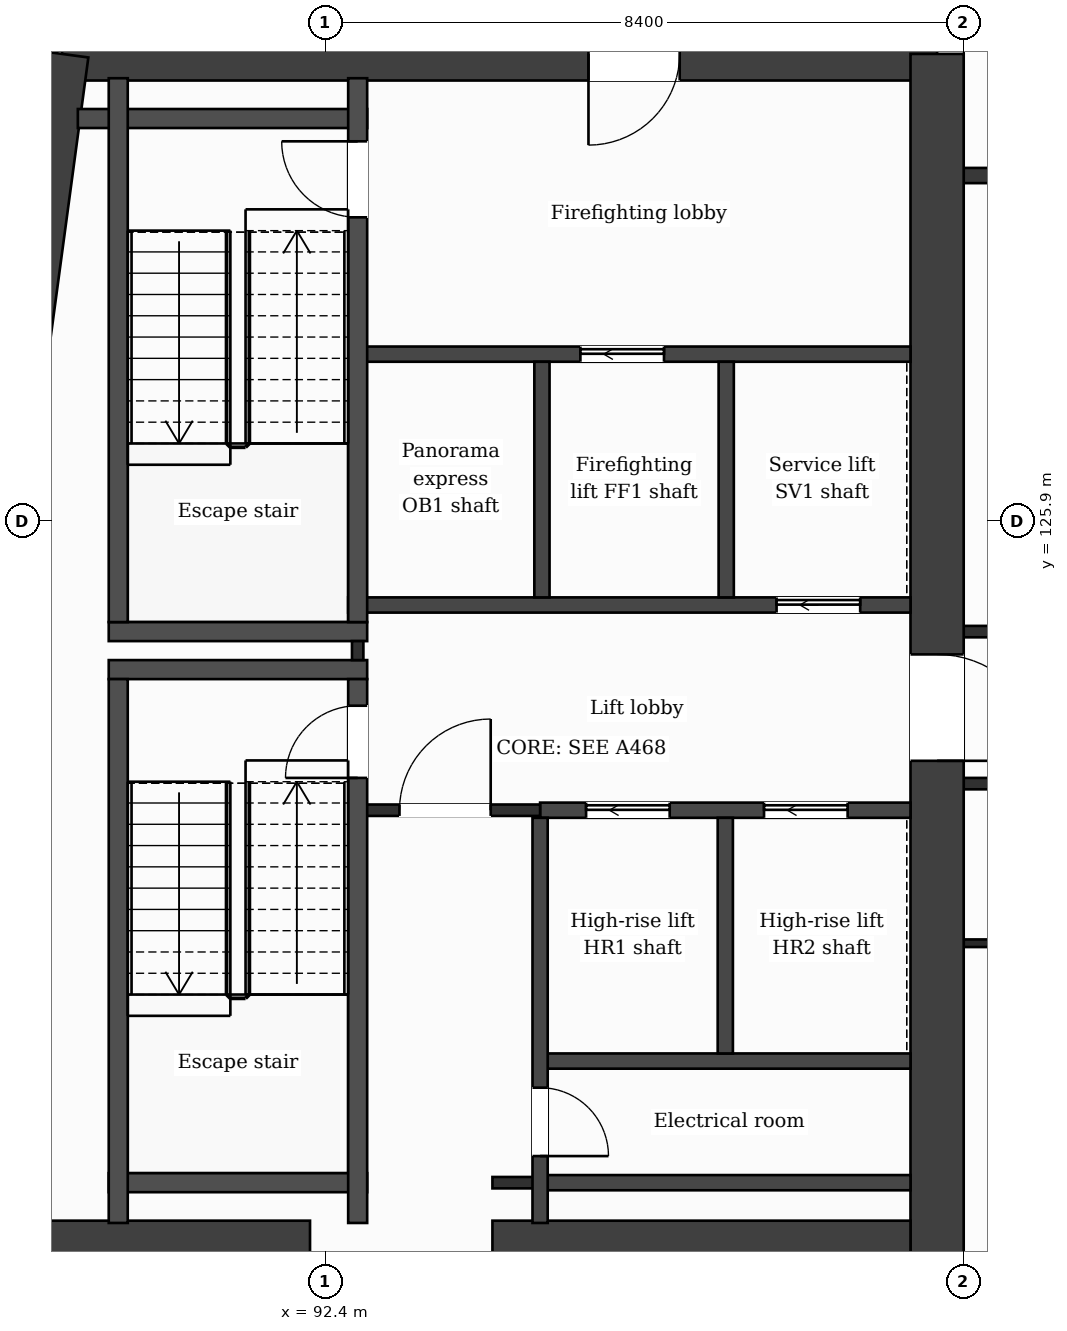
"""IFC4 building model, lengths in metres.
Left out: names, types, materials, properties, quantities, classifications, styles, units other than length and angle.
Written with IfcOpenShell. Run it as: python <this file> out.ifc"""

import sys

from ifc_helpers import new_model, si_unit, direction, frame, frame_2d, origin, place, context, subcontext, project, spatial, rectangle, extrude, element, fill, save


model = new_model("IFC4")
c1 = context("Model", 3, precision=1e-05, world=origin(), true_north=direction((0.0, 1.0)))
c2 = subcontext(c1, "Body", "Model", "MODEL_VIEW")
j1 = project(units=[si_unit("LENGTHUNIT", "METRE"), si_unit("PLANEANGLEUNIT", "RADIAN")], contexts=[c1])
p1 = place(None, origin())
s1 = spatial("IfcSite", under=j1, at=p1, CompositionType="ELEMENT")
p2 = place(p1, origin())
s2 = spatial("IfcBuilding", under=s1, at=p2, CompositionType="ELEMENT")
p3 = place(p2, frame((0.0, 0.0, 277.5)))
s3 = spatial("IfcBuildingStorey", under=s2, at=p3, CompositionType="ELEMENT", Elevation=277.5)
p4 = place(p3, frame((88.937, 132.05, 0.0), z_axis=(0.0, 0.0, 1.0), x_axis=(1.0, 0.0, 0.0)))
e1 = element("IfcWall", 1, at=p4, inside=s3, PredefinedType="SHEAR", context=c2, shape_type="SweptSolid", body=[
    extrude(rectangle(XDim=11.513, YDim=0.7, at=frame_2d((5.757, 0.0))), origin(), (0.0, 0.0, 1.0), 3.7),
])
p5 = place(p4, frame((6.927, 0.0, 0.0)))
e2 = element("IfcOpeningElement", 2, at=p5, cuts=e1, PredefinedType="OPENING", context=c2, shape_type="SweptSolid", body=[
    extrude(rectangle(XDim=1.2, YDim=2.1, at=frame_2d((0.6, 1.05))), frame((0.0, 0.36, 0.0), z_axis=(0.0, -1.0, 0.0), x_axis=(1.0, 0.0, 0.0)), (0.0, 0.0, 1.0), 0.72),
])
p6 = place(p3, frame((100.45, 132.05, 0.0), z_axis=(0.0, 0.0, 1.0), x_axis=(0.0, -1.0, 0.0)))
e3 = element("IfcWall", 3, at=p6, inside=s3, PredefinedType="SHEAR", context=c2, shape_type="SweptSolid", body=[
    extrude(rectangle(XDim=21.3, YDim=0.7, at=frame_2d((10.65, 0.0))), origin(), (0.0, 0.0, 1.0), 3.7),
])
p7 = place(p6, frame((7.9, 0.0, 0.0)))
e4 = element("IfcOpeningElement", 4, at=p7, cuts=e3, PredefinedType="OPENING", context=c2, shape_type="SweptSolid", body=[
    extrude(rectangle(XDim=1.4, YDim=2.1, at=frame_2d((0.7, 1.05))), frame((0.0, 0.36, 0.0), z_axis=(0.0, -1.0, 0.0), x_axis=(1.0, 0.0, 0.0)), (0.0, 0.0, 1.0), 0.72),
])
p8 = place(p3, frame((86.07, 110.75, 0.0), z_axis=(0.0, 0.0, 1.0), x_axis=(0.133406218907, 0.991061441464, 0.0)))
e5 = element("IfcWall", 5, at=p8, inside=s3, PredefinedType="SHEAR", context=c2, shape_type="SweptSolid", body=[
    extrude(rectangle(XDim=21.492, YDim=0.7, at=frame_2d((10.746, 0.0))), origin(), (0.0, 0.0, 1.0), 3.7),
])
p9 = place(p3, frame((87.123, 116.35, 0.0), z_axis=(0.0, 0.0, 1.0), x_axis=(1.0, 0.0, 0.0)))
e6 = element("IfcWall", 6, at=p9, inside=s3, PredefinedType="SHEAR", context=c2, shape_type="SweptSolid", body=[
    extrude(rectangle(XDim=5.077, YDim=0.7, at=frame_2d((2.539, 0.0))), origin(), (0.0, 0.0, 1.0), 3.7),
])
p10 = place(p3, frame((94.6, 116.35, 0.0), z_axis=(0.0, 0.0, 1.0), x_axis=(1.0, 0.0, 0.0)))
e7 = element("IfcWall", 7, at=p10, inside=s3, PredefinedType="SHEAR", context=c2, shape_type="SweptSolid", body=[
    extrude(rectangle(XDim=5.5, YDim=0.7, at=frame_2d((2.75, 0.0))), origin(), (0.0, 0.0, 1.0), 3.7),
])
p11 = place(p3, frame((95.227, 117.2, 0.0), z_axis=(0.0, 0.0, 1.0), x_axis=(1.0, 0.0, 0.0)))
e8 = element("IfcWall", 8, at=p11, inside=s3, PredefinedType="PARTITIONING", context=c2, shape_type="SweptSolid", body=[
    extrude(rectangle(XDim=4.873, YDim=0.2, at=frame_2d((2.437, 0.0))), origin(), (0.0, 0.0, 1.0), 3.38),
])
p12 = place(p3, frame((94.6, 117.2, 0.0), z_axis=(0.0, 0.0, 1.0), x_axis=(1.0, 0.0, 0.0)))
e9 = element("IfcWall", 9, at=p12, inside=s3, PredefinedType="PARTITIONING", context=c2, shape_type="SweptSolid", body=[
    extrude(rectangle(XDim=0.627, YDim=0.15, at=frame_2d((0.313, 0.0))), origin(), (0.0, 0.0, 1.0), 3.38),
])
p13 = place(p3, frame((89.552, 117.2, 0.0), z_axis=(0.0, 0.0, 1.0), x_axis=(1.0, 0.0, 0.0)))
e10 = element("IfcWall", 10, at=p13, inside=s3, PredefinedType="PARTITIONING", context=c2, shape_type="SweptSolid", body=[
    extrude(rectangle(XDim=3.4, YDim=0.25, at=frame_2d((1.7, 0.0))), origin(), (0.0, 0.0, 1.0), 3.38),
])
p14 = place(p3, frame((95.227, 118.8, 0.0), z_axis=(0.0, 0.0, 1.0), x_axis=(1.0, 0.0, 0.0)))
e11 = element("IfcWall", 11, at=p14, inside=s3, PredefinedType="PARTITIONING", context=c2, shape_type="SweptSolid", body=[
    extrude(rectangle(XDim=4.873, YDim=0.2, at=frame_2d((2.437, 0.0))), origin(), (0.0, 0.0, 1.0), 3.38),
])
p15 = place(p3, frame((100.8, 120.35, 0.0), z_axis=(0.0, 0.0, 1.0), x_axis=(1.0, 0.0, 0.0)))
e12 = element("IfcWall", 12, at=p15, inside=s3, PredefinedType="PARTITIONING", context=c2, shape_type="SweptSolid", body=[
    extrude(rectangle(XDim=2.75, YDim=0.1, at=frame_2d((1.375, 0.0))), origin(), (0.0, 0.0, 1.0), 3.38),
])
p16 = place(p15, frame((1.07, 0.0, 0.0)))
e13 = element("IfcOpeningElement", 13, at=p16, cuts=e12, PredefinedType="OPENING", context=c2, shape_type="SweptSolid", body=[
    extrude(rectangle(XDim=0.8, YDim=2.1, at=frame_2d((0.4, 1.05))), frame((0.0, 0.06, 0.0), z_axis=(0.0, -1.0, 0.0), x_axis=(1.0, 0.0, 0.0)), (0.0, 0.0, 1.0), 0.12),
])
p17 = place(p3, frame((95.227, 122.1, 0.0), z_axis=(0.0, 0.0, 1.0), x_axis=(1.0, 0.0, 0.0)))
e14 = element("IfcWall", 14, at=p17, inside=s3, PredefinedType="PARTITIONING", context=c2, shape_type="SweptSolid", body=[
    extrude(rectangle(XDim=4.873, YDim=0.2, at=frame_2d((2.437, 0.0))), origin(), (0.0, 0.0, 1.0), 3.38),
])
p18 = place(p17, frame((0.605, 0.0, 0.0)))
e15 = element("IfcOpeningElement", 15, at=p18, cuts=e14, PredefinedType="OPENING", context=c2, shape_type="SweptSolid", body=[
    extrude(rectangle(XDim=1.1, YDim=2.1, at=frame_2d((0.55, 1.05))), frame((0.0, 0.11, 0.0), z_axis=(0.0, -1.0, 0.0), x_axis=(1.0, 0.0, 0.0)), (0.0, 0.0, 1.0), 0.22),
])
p19 = place(p17, frame((2.946, 0.0, 0.0)))
e16 = element("IfcOpeningElement", 16, at=p19, cuts=e14, PredefinedType="OPENING", context=c2, shape_type="SweptSolid", body=[
    extrude(rectangle(XDim=1.1, YDim=2.1, at=frame_2d((0.55, 1.05))), frame((0.0, 0.11, 0.0), z_axis=(0.0, -1.0, 0.0), x_axis=(1.0, 0.0, 0.0)), (0.0, 0.0, 1.0), 0.22),
])
p20 = place(p3, frame((92.827, 122.1, 0.0), z_axis=(0.0, 0.0, 1.0), x_axis=(1.0, 0.0, 0.0)))
e17 = element("IfcWall", 17, at=p20, inside=s3, PredefinedType="PARTITIONING", context=c2, shape_type="SweptSolid", body=[
    extrude(rectangle(XDim=2.4, YDim=0.15, at=frame_2d((1.2, 0.0))), origin(), (0.0, 0.0, 1.0), 3.38),
])
p21 = place(p20, frame((0.55, 0.0, 0.0)))
e18 = element("IfcOpeningElement", 18, at=p21, cuts=e17, PredefinedType="OPENING", context=c2, shape_type="SweptSolid", body=[
    extrude(rectangle(XDim=1.2, YDim=2.1, at=frame_2d((0.6, 1.05))), frame((0.0, 0.085, 0.0), z_axis=(0.0, -1.0, 0.0), x_axis=(1.0, 0.0, 0.0)), (0.0, 0.0, 1.0), 0.17),
])
p22 = place(p3, frame((100.8, 122.45, 0.0), z_axis=(0.0, 0.0, 1.0), x_axis=(1.0, 0.0, 0.0)))
e19 = element("IfcWall", 19, at=p22, inside=s3, PredefinedType="PARTITIONING", context=c2, shape_type="SweptSolid", body=[
    extrude(rectangle(XDim=25.2, YDim=0.15, at=frame_2d((12.6, 0.0))), origin(), (0.0, 0.0, 1.0), 3.38),
])
p23 = place(p22, frame((5.55, 0.0, 0.0)))
e20 = element("IfcOpeningElement", 20, at=p23, cuts=e19, PredefinedType="OPENING", context=c2, shape_type="SweptSolid", body=[
    extrude(rectangle(XDim=1.0, YDim=2.1, at=frame_2d((0.5, 1.05))), frame((0.0, 0.085, 0.0), z_axis=(0.0, -1.0, 0.0), x_axis=(1.0, 0.0, 0.0)), (0.0, 0.0, 1.0), 0.17),
])
p24 = place(p22, frame((8.862, 0.0, 0.0)))
e21 = element("IfcOpeningElement", 21, at=p24, cuts=e19, PredefinedType="OPENING", context=c2, shape_type="SweptSolid", body=[
    extrude(rectangle(XDim=0.95, YDim=2.1, at=frame_2d((0.475, 1.05))), frame((0.0, 0.085, 0.0), z_axis=(0.0, -1.0, 0.0), x_axis=(1.0, 0.0, 0.0)), (0.0, 0.0, 1.0), 0.17),
])
p25 = place(p22, frame((15.2, 0.0, 0.0)))
e22 = element("IfcOpeningElement", 22, at=p25, cuts=e19, PredefinedType="OPENING", context=c2, shape_type="SweptSolid", body=[
    extrude(rectangle(XDim=0.95, YDim=2.1, at=frame_2d((0.475, 1.05))), frame((0.0, 0.085, 0.0), z_axis=(0.0, -1.0, 0.0), x_axis=(1.0, 0.0, 0.0)), (0.0, 0.0, 1.0), 0.17),
])
p26 = place(p22, frame((17.325, 0.0, 0.0)))
e23 = element("IfcOpeningElement", 23, at=p26, cuts=e19, PredefinedType="OPENING", context=c2, shape_type="SweptSolid", body=[
    extrude(rectangle(XDim=1.0, YDim=2.1, at=frame_2d((0.5, 1.05))), frame((0.0, 0.085, 0.0), z_axis=(0.0, -1.0, 0.0), x_axis=(1.0, 0.0, 0.0)), (0.0, 0.0, 1.0), 0.17),
])
p27 = place(p22, frame((23.862, 0.0, 0.0)))
e24 = element("IfcOpeningElement", 24, at=p27, cuts=e19, PredefinedType="OPENING", context=c2, shape_type="SweptSolid", body=[
    extrude(rectangle(XDim=0.95, YDim=2.1, at=frame_2d((0.475, 1.05))), frame((0.0, 0.085, 0.0), z_axis=(0.0, -1.0, 0.0), x_axis=(1.0, 0.0, 0.0)), (0.0, 0.0, 1.0), 0.17),
])
for number, where, z_axis, x_axis in (
    (25, (89.552, 123.95, 0.0), (0.0, 0.0, 1.0), (1.0, 0.0, 0.0)),
    (26, (89.552, 124.45, 0.0), (0.0, 0.0, 1.0), (1.0, 0.0, 0.0)),
):
    element("IfcWall", number, at=place(p3, frame(where, z_axis=z_axis, x_axis=x_axis)), inside=s3, PredefinedType="PARTITIONING", context=c2, shape_type="SweptSolid", body=[
        extrude(rectangle(XDim=3.4, YDim=0.25, at=frame_2d((1.7, 0.0))), origin(), (0.0, 0.0, 1.0), 3.38),
    ])
p28 = place(p3, frame((100.8, 124.45, 0.0), z_axis=(0.0, 0.0, 1.0), x_axis=(1.0, 0.0, 0.0)))
e27 = element("IfcWall", 27, at=p28, inside=s3, PredefinedType="PARTITIONING", context=c2, shape_type="SweptSolid", body=[
    extrude(rectangle(XDim=25.2, YDim=0.15, at=frame_2d((12.6, 0.0))), origin(), (0.0, 0.0, 1.0), 3.38),
])
p29 = place(p28, frame((6.125, 0.0, 0.0)))
e28 = element("IfcOpeningElement", 28, at=p29, cuts=e27, PredefinedType="OPENING", context=c2, shape_type="SweptSolid", body=[
    extrude(rectangle(XDim=1.0, YDim=2.1, at=frame_2d((0.5, 1.05))), frame((0.0, 0.085, 0.0), z_axis=(0.0, -1.0, 0.0), x_axis=(1.0, 0.0, 0.0)), (0.0, 0.0, 1.0), 0.17),
])
p30 = place(p28, frame((1.325, 0.0, 0.0)))
e29 = element("IfcOpeningElement", 29, at=p30, cuts=e27, PredefinedType="OPENING", context=c2, shape_type="SweptSolid", body=[
    extrude(rectangle(XDim=1.0, YDim=2.1, at=frame_2d((0.5, 1.05))), frame((0.0, 0.085, 0.0), z_axis=(0.0, -1.0, 0.0), x_axis=(1.0, 0.0, 0.0)), (0.0, 0.0, 1.0), 0.17),
])
p31 = place(p28, frame((11.43, 0.0, 0.0)))
e30 = element("IfcOpeningElement", 30, at=p31, cuts=e27, PredefinedType="OPENING", context=c2, shape_type="SweptSolid", body=[
    extrude(rectangle(XDim=1.0, YDim=2.1, at=frame_2d((0.5, 1.05))), frame((0.0, 0.085, 0.0), z_axis=(0.0, -1.0, 0.0), x_axis=(1.0, 0.0, 0.0)), (0.0, 0.0, 1.0), 0.17),
])
p32 = place(p28, frame((21.17, 0.0, 0.0)))
e31 = element("IfcOpeningElement", 31, at=p32, cuts=e27, PredefinedType="OPENING", context=c2, shape_type="SweptSolid", body=[
    extrude(rectangle(XDim=1.0, YDim=2.1, at=frame_2d((0.5, 1.05))), frame((0.0, 0.085, 0.0), z_axis=(0.0, -1.0, 0.0), x_axis=(1.0, 0.0, 0.0)), (0.0, 0.0, 1.0), 0.17),
])
p33 = place(p3, frame((92.702, 124.8, 0.0), z_axis=(0.0, 0.0, 1.0), x_axis=(1.0, 0.0, 0.0)))
e32 = element("IfcWall", 32, at=p33, inside=s3, PredefinedType="PARTITIONING", context=c2, shape_type="SweptSolid", body=[
    extrude(rectangle(XDim=7.398, YDim=0.2, at=frame_2d((3.699, 0.0))), origin(), (0.0, 0.0, 1.0), 3.38),
])
p34 = place(p33, frame((5.636, 0.0, 0.0)))
e33 = element("IfcOpeningElement", 33, at=p34, cuts=e32, PredefinedType="OPENING", context=c2, shape_type="SweptSolid", body=[
    extrude(rectangle(XDim=1.1, YDim=2.1, at=frame_2d((0.55, 1.05))), frame((0.0, 0.11, 0.0), z_axis=(0.0, -1.0, 0.0), x_axis=(1.0, 0.0, 0.0)), (0.0, 0.0, 1.0), 0.22),
])
p35 = place(p3, frame((92.827, 128.1, 0.0), z_axis=(0.0, 0.0, 1.0), x_axis=(1.0, 0.0, 0.0)))
e34 = element("IfcWall", 34, at=p35, inside=s3, PredefinedType="PARTITIONING", context=c2, shape_type="SweptSolid", body=[
    extrude(rectangle(XDim=7.273, YDim=0.2, at=frame_2d((3.637, 0.0))), origin(), (0.0, 0.0, 1.0), 3.38),
])
p36 = place(p35, frame((2.93, 0.0, 0.0)))
e35 = element("IfcOpeningElement", 35, at=p36, cuts=e34, PredefinedType="OPENING", context=c2, shape_type="SweptSolid", body=[
    extrude(rectangle(XDim=1.1, YDim=2.1, at=frame_2d((0.55, 1.05))), frame((0.0, 0.11, 0.0), z_axis=(0.0, -1.0, 0.0), x_axis=(1.0, 0.0, 0.0)), (0.0, 0.0, 1.0), 0.22),
])
p37 = place(p3, frame((100.8, 130.45, 0.0), z_axis=(0.0, 0.0, 1.0), x_axis=(1.0, 0.0, 0.0)))
e36 = element("IfcWall", 36, at=p37, inside=s3, PredefinedType="PARTITIONING", context=c2, shape_type="SweptSolid", body=[
    extrude(rectangle(XDim=3.1, YDim=0.2, at=frame_2d((1.55, 0.0))), origin(), (0.0, 0.0, 1.0), 3.38),
])
p38 = place(p3, frame((89.146, 131.2, 0.0), z_axis=(0.0, 0.0, 1.0), x_axis=(1.0, 0.0, 0.0)))
e37 = element("IfcWall", 37, at=p38, inside=s3, PredefinedType="PARTITIONING", context=c2, shape_type="SweptSolid", body=[
    extrude(rectangle(XDim=3.806, YDim=0.25, at=frame_2d((1.903, 0.0))), origin(), (0.0, 0.0, 1.0), 3.38),
])
for number, where, z_axis, x_axis in (
    (38, (89.677, 116.67, 0.0), (0.0, 0.0, 1.0), (0.0, 1.0, 0.0)),
    (39, (89.677, 124.575, 0.0), (0.0, 0.0, 1.0), (0.0, 1.0, 0.0)),
):
    element("IfcWall", number, at=place(p3, frame(where, z_axis=z_axis, x_axis=x_axis)), inside=s3, PredefinedType="PARTITIONING", context=c2, shape_type="SweptSolid", body=[
        extrude(rectangle(XDim=7.155, YDim=0.25, at=frame_2d((3.578, 0.0))), origin(), (0.0, 0.0, 1.0), 3.38),
    ])
p39 = place(p3, frame((92.827, 124.075, 0.0), z_axis=(0.0, 0.0, 1.0), x_axis=(0.0, 1.0, 0.0)))
e40 = element("IfcWall", 40, at=p39, inside=s3, PredefinedType="PARTITIONING", context=c2, shape_type="SweptSolid", body=[
    extrude(rectangle(XDim=0.25, YDim=0.15, at=frame_2d((0.125, 0.0))), origin(), (0.0, 0.0, 1.0), 3.38),
])
p40 = place(p3, frame((92.827, 116.67, 0.0), z_axis=(0.0, 0.0, 1.0), x_axis=(0.0, 1.0, 0.0)))
e41 = element("IfcWall", 41, at=p40, inside=s3, PredefinedType="PARTITIONING", context=c2, shape_type="SweptSolid", body=[
    extrude(rectangle(XDim=7.155, YDim=0.25, at=frame_2d((3.578, 0.0))), origin(), (0.0, 0.0, 1.0), 3.38),
])
p41 = place(p40, frame((5.855, 0.0, 0.0)))
e42 = element("IfcOpeningElement", 42, at=p41, cuts=e41, PredefinedType="OPENING", context=c2, shape_type="SweptSolid", body=[
    extrude(rectangle(XDim=0.95, YDim=2.1, at=frame_2d((0.475, 1.05))), frame((0.0, 0.135, 0.0), z_axis=(0.0, -1.0, 0.0), x_axis=(1.0, 0.0, 0.0)), (0.0, 0.0, 1.0), 0.27),
])
p42 = place(p3, frame((92.827, 124.575, 0.0), z_axis=(0.0, 0.0, 1.0), x_axis=(0.0, 1.0, 0.0)))
e43 = element("IfcWall", 43, at=p42, inside=s3, PredefinedType="PARTITIONING", context=c2, shape_type="SweptSolid", body=[
    extrude(rectangle(XDim=7.155, YDim=0.25, at=frame_2d((3.578, 0.0))), origin(), (0.0, 0.0, 1.0), 3.38),
])
p43 = place(p42, frame((5.325, 0.0, 0.0)))
e44 = element("IfcOpeningElement", 44, at=p43, cuts=e43, PredefinedType="OPENING", context=c2, shape_type="SweptSolid", body=[
    extrude(rectangle(XDim=1.0, YDim=2.1, at=frame_2d((0.5, 1.05))), frame((0.0, 0.135, 0.0), z_axis=(0.0, -1.0, 0.0), x_axis=(1.0, 0.0, 0.0)), (0.0, 0.0, 1.0), 0.27),
])
p44 = place(p3, frame((95.227, 116.67, 0.0), z_axis=(0.0, 0.0, 1.0), x_axis=(0.0, 1.0, 0.0)))
e45 = element("IfcWall", 45, at=p44, inside=s3, PredefinedType="PARTITIONING", context=c2, shape_type="SweptSolid", body=[
    extrude(rectangle(XDim=5.33, YDim=0.2, at=frame_2d((2.665, 0.0))), origin(), (0.0, 0.0, 1.0), 3.38),
])
p45 = place(p44, frame((0.88, 0.0, 0.0)))
e46 = element("IfcOpeningElement", 46, at=p45, cuts=e45, PredefinedType="OPENING", context=c2, shape_type="SweptSolid", body=[
    extrude(rectangle(XDim=0.9, YDim=2.1, at=frame_2d((0.45, 1.05))), frame((0.0, 0.11, 0.0), z_axis=(0.0, -1.0, 0.0), x_axis=(1.0, 0.0, 0.0)), (0.0, 0.0, 1.0), 0.22),
])
for number, where, z_axis, x_axis in (
    (47, (95.251, 124.9, 0.0), (0.0, 0.0, 1.0), (0.0, 1.0, 0.0)),
    (48, (97.664, 118.9, 0.0), (0.0, 0.0, 1.0), (0.0, 1.0, 0.0)),
    (49, (97.676, 124.9, 0.0), (0.0, 0.0, 1.0), (0.0, 1.0, 0.0)),
):
    element("IfcWall", number, at=place(p3, frame(where, z_axis=z_axis, x_axis=x_axis)), inside=s3, PredefinedType="PARTITIONING", context=c2, shape_type="SweptSolid", body=[
        extrude(rectangle(XDim=3.1, YDim=0.2, at=frame_2d((1.55, 0.0))), origin(), (0.0, 0.0, 1.0), 3.38),
    ])
p46 = place(p21, origin())
e50 = element("IfcDoor", 50, at=p46, inside=s3, OperationType="SINGLE_SWING_RIGHT", PredefinedType="DOOR", context=c2, shape_type="SweptSolid", body=[
    extrude(rectangle(XDim=1.2, YDim=2.1, at=frame_2d((0.6, 1.05))), frame((0.0, 0.025, 0.0), z_axis=(0.0, -1.0, 0.0), x_axis=(1.0, 0.0, 0.0)), (0.0, 0.0, 1.0), 0.05),
])
fill(e18, e50)
p47 = place(p18, origin())
e51 = element("IfcDoor", 51, at=p47, inside=s3, OperationType="SLIDING_TO_LEFT", PredefinedType="DOOR", context=c2, shape_type="SweptSolid", body=[
    extrude(rectangle(XDim=1.1, YDim=2.1, at=frame_2d((0.55, 1.05))), frame((0.0, 0.025, 0.0), z_axis=(0.0, -1.0, 0.0), x_axis=(1.0, 0.0, 0.0)), (0.0, 0.0, 1.0), 0.05),
])
fill(e15, e51)
p48 = place(p19, origin())
e52 = element("IfcDoor", 52, at=p48, inside=s3, OperationType="SLIDING_TO_LEFT", PredefinedType="DOOR", context=c2, shape_type="SweptSolid", body=[
    extrude(rectangle(XDim=1.1, YDim=2.1, at=frame_2d((0.55, 1.05))), frame((0.0, 0.025, 0.0), z_axis=(0.0, -1.0, 0.0), x_axis=(1.0, 0.0, 0.0)), (0.0, 0.0, 1.0), 0.05),
])
fill(e16, e52)
p49 = place(p36, origin())
e53 = element("IfcDoor", 53, at=p49, inside=s3, OperationType="SLIDING_TO_LEFT", PredefinedType="DOOR", context=c2, shape_type="SweptSolid", body=[
    extrude(rectangle(XDim=1.1, YDim=2.1, at=frame_2d((0.55, 1.05))), frame((0.0, 0.025, 0.0), z_axis=(0.0, -1.0, 0.0), x_axis=(1.0, 0.0, 0.0)), (0.0, 0.0, 1.0), 0.05),
])
fill(e35, e53)
p50 = place(p34, origin())
e54 = element("IfcDoor", 54, at=p50, inside=s3, OperationType="SLIDING_TO_LEFT", PredefinedType="DOOR", context=c2, shape_type="SweptSolid", body=[
    extrude(rectangle(XDim=1.1, YDim=2.1, at=frame_2d((0.55, 1.05))), frame((0.0, 0.025, 0.0), z_axis=(0.0, -1.0, 0.0), x_axis=(1.0, 0.0, 0.0)), (0.0, 0.0, 1.0), 0.05),
])
fill(e33, e54)
p51 = place(p41, origin())
e55 = element("IfcDoor", 55, at=p51, inside=s3, OperationType="SINGLE_SWING_LEFT", PredefinedType="DOOR", context=c2, shape_type="SweptSolid", body=[
    extrude(rectangle(XDim=0.95, YDim=2.1, at=frame_2d((0.475, 1.05))), frame((0.0, 0.025, 0.0), z_axis=(0.0, -1.0, 0.0), x_axis=(1.0, 0.0, 0.0)), (0.0, 0.0, 1.0), 0.05),
])
fill(e42, e55)
p52 = place(p43, origin())
e56 = element("IfcDoor", 56, at=p52, inside=s3, OperationType="SINGLE_SWING_RIGHT", PredefinedType="DOOR", context=c2, shape_type="SweptSolid", body=[
    extrude(rectangle(XDim=1.0, YDim=2.1, at=frame_2d((0.5, 1.05))), frame((0.0, 0.025, 0.0), z_axis=(0.0, -1.0, 0.0), x_axis=(1.0, 0.0, 0.0)), (0.0, 0.0, 1.0), 0.05),
])
fill(e44, e56)
p53 = place(p45, origin())
e57 = element("IfcDoor", 57, at=p53, inside=s3, OperationType="SINGLE_SWING_LEFT", PredefinedType="DOOR", context=c2, shape_type="SweptSolid", body=[
    extrude(rectangle(XDim=0.9, YDim=2.1, at=frame_2d((0.45, 1.05))), frame((0.0, 0.025, 0.0), z_axis=(0.0, -1.0, 0.0), x_axis=(1.0, 0.0, 0.0)), (0.0, 0.0, 1.0), 0.05),
])
fill(e46, e57)
p54 = place(p5, origin())
e58 = element("IfcDoor", 58, at=p54, inside=s3, OperationType="SINGLE_SWING_LEFT", PredefinedType="DOOR", context=c2, shape_type="SweptSolid", body=[
    extrude(rectangle(XDim=1.2, YDim=2.1, at=frame_2d((0.6, 1.05))), frame((0.0, 0.025, 0.0), z_axis=(0.0, -1.0, 0.0), x_axis=(1.0, 0.0, 0.0)), (0.0, 0.0, 1.0), 0.05),
])
fill(e2, e58)
p55 = place(p7, origin())
e59 = element("IfcDoor", 59, at=p55, inside=s3, OperationType="SINGLE_SWING_RIGHT", PredefinedType="DOOR", context=c2, shape_type="SweptSolid", body=[
    extrude(rectangle(XDim=1.4, YDim=2.1, at=frame_2d((0.7, 1.05))), frame((0.0, 0.025, 0.0), z_axis=(0.0, -1.0, 0.0), x_axis=(1.0, 0.0, 0.0)), (0.0, 0.0, 1.0), 0.05),
])
fill(e4, e59)
save(model, sys.argv[1])
